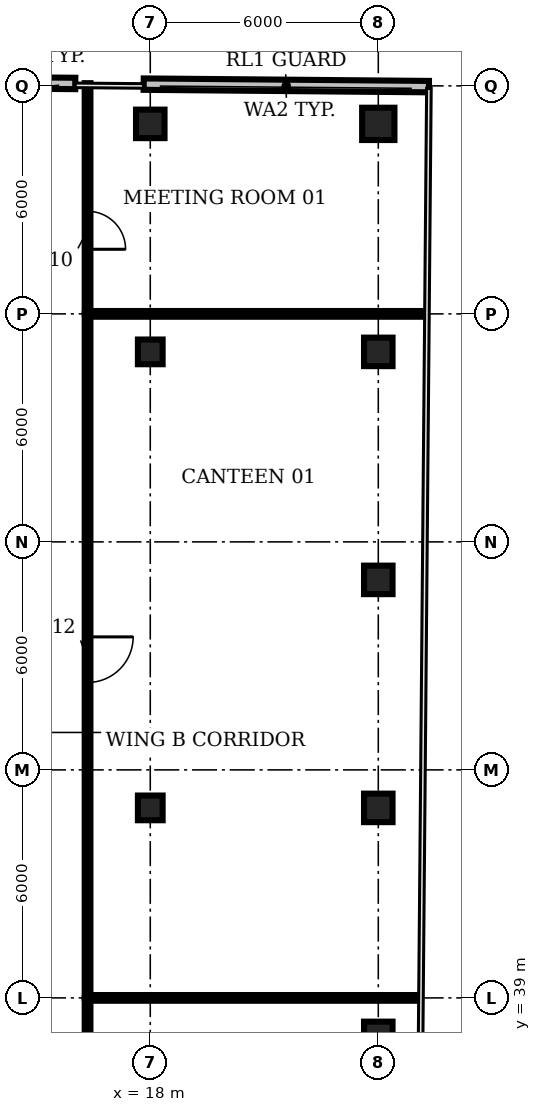
"""IFC4 building model, lengths in metres.
Left out: names, types, materials, properties, quantities, classifications, styles, units other than length and angle.
Written with IfcOpenShell. Run it as: python <this file> out.ifc"""

import sys

from ifc_helpers import new_model, si_unit, direction, frame, frame_2d, origin, origin_2d, place, context, subcontext, project, spatial, rectangle, circle, extrude, element, fill, save


model = new_model("IFC4")
c1 = context("Model", 3, precision=1e-05, world=origin(), true_north=direction((0.0, 1.0)))
c2 = subcontext(c1, "Body", "Model", "MODEL_VIEW")
j1 = project(units=[si_unit("LENGTHUNIT", "METRE"), si_unit("PLANEANGLEUNIT", "RADIAN")], contexts=[c1])
p1 = place(None, origin())
s1 = spatial("IfcSite", under=j1, at=p1, CompositionType="ELEMENT")
p2 = place(p1, origin())
s2 = spatial("IfcBuilding", under=s1, at=p2, CompositionType="ELEMENT")
p3 = place(p2, frame((0.0, 0.0, 285.2)))
s3 = spatial("IfcBuildingStorey", under=s2, at=p3, CompositionType="ELEMENT", Elevation=285.2)
for number, where, z_axis, x_axis in (
    (1, (18.0, 44.0, 0.0), (0.0, 0.0, 1.0), (1.0, 0.0, 0.0)),
    (2, (18.0, 56.0, 0.0), (0.0, 0.0, 1.0), (1.0, 0.0, 0.0)),
):
    element("IfcColumn", number, at=place(p3, frame(where, z_axis=z_axis, x_axis=x_axis)), inside=s3, PredefinedType="COLUMN", context=c2, shape_type="SweptSolid", body=[
        extrude(rectangle(XDim=0.65, YDim=0.65, at=origin_2d()), origin(), (0.0, 0.0, 1.0), 3.85),
    ])
for number, where, z_axis, x_axis in (
    (3, (18.0, 62.0, 0.0), (0.0, 0.0, 1.0), (1.0, 0.0, 0.0)),
    (4, (24.0, 38.0, 0.0), (0.0, 0.0, 1.0), (1.0, 0.0, 0.0)),
    (5, (24.0, 44.0, 0.0), (0.0, 0.0, 1.0), (1.0, 0.0, 0.0)),
    (6, (24.0, 50.0, 0.0), (0.0, 0.0, 1.0), (1.0, 0.0, 0.0)),
    (7, (24.0, 56.0, 0.0), (0.0, 0.0, 1.0), (1.0, 0.0, 0.0)),
):
    element("IfcColumn", number, at=place(p3, frame(where, z_axis=z_axis, x_axis=x_axis)), inside=s3, PredefinedType="COLUMN", context=c2, shape_type="SweptSolid", body=[
        extrude(rectangle(XDim=0.75, YDim=0.75, at=origin_2d()), origin(), (0.0, 0.0, 1.0), 3.85),
    ])
p4 = place(p3, frame((24.0, 62.0, 0.0), z_axis=(0.0, 0.0, 1.0), x_axis=(1.0, 0.0, 0.0)))
e8 = element("IfcColumn", 8, at=p4, inside=s3, PredefinedType="COLUMN", context=c2, shape_type="SweptSolid", body=[
    extrude(circle(Radius=0.425, at=origin_2d()), origin(), (0.0, 0.0, 1.0), 3.85),
])
p5 = place(p3, frame((25.332, 62.98, 0.0), z_axis=(0.0, 0.0, 1.0), x_axis=(-0.999961723794, 0.008749339829, 0.0)))
e9 = element("IfcWall", 9, at=p5, inside=s3, PredefinedType="SOLIDWALL", context=c2, shape_type="SweptSolid", body=[
    extrude(rectangle(XDim=7.506, YDim=0.3, at=frame_2d((3.753, 0.0))), origin(), (0.0, 0.0, 1.0), 3.85),
])
p6 = place(p3, frame((16.027, 63.063, 0.0), z_axis=(0.0, 0.0, 1.0), x_axis=(-0.999961913014, 0.008727687086, 0.0)))
e10 = element("IfcWall", 10, at=p6, inside=s3, PredefinedType="SOLIDWALL", context=c2, shape_type="SweptSolid", body=[
    extrude(rectangle(XDim=1.902, YDim=0.3, at=frame_2d((0.951, 0.0))), origin(), (0.0, 0.0, 1.0), 3.85),
])
p7 = place(p3, frame((16.35, 39.0, 0.0), z_axis=(0.0, 0.0, 1.0), x_axis=(0.0, -1.0, 0.0)))
e11 = element("IfcWall", 11, at=p7, inside=s3, PredefinedType="PARTITIONING", context=c2, shape_type="SweptSolid", body=[
    extrude(rectangle(XDim=5.2, YDim=0.15, at=frame_2d((2.6, 0.0))), origin(), (0.0, 0.0, 1.0), 2.9),
])
p8 = place(p7, frame((2.2, 0.0, 0.0)))
e12 = element("IfcOpeningElement", 12, at=p8, cuts=e11, PredefinedType="OPENING", context=c2, shape_type="SweptSolid", body=[
    extrude(rectangle(XDim=1.0, YDim=2.1, at=frame_2d((0.5, 1.05))), frame((0.0, 0.085, 0.0), z_axis=(0.0, -1.0, 0.0), x_axis=(1.0, 0.0, 0.0)), (0.0, 0.0, 1.0), 0.17),
])
p9 = place(p3, frame((16.35, 39.0, 0.0), z_axis=(0.0, 0.0, 1.0), x_axis=(1.0, 0.0, 0.0)))
e13 = element("IfcWall", 13, at=p9, inside=s3, PredefinedType="PARTITIONING", context=c2, shape_type="SweptSolid", body=[
    extrude(rectangle(XDim=8.72, YDim=0.15, at=frame_2d((4.36, 0.0))), origin(), (0.0, 0.0, 1.0), 2.9),
])
p10 = place(p3, frame((16.35, 57.0, 0.0), z_axis=(0.0, 0.0, 1.0), x_axis=(0.0, -1.0, 0.0)))
e14 = element("IfcWall", 14, at=p10, inside=s3, PredefinedType="PARTITIONING", context=c2, shape_type="SweptSolid", body=[
    extrude(rectangle(XDim=18.0, YDim=0.15, at=frame_2d((9.0, 0.0))), origin(), (0.0, 0.0, 1.0), 2.9),
])
p11 = place(p10, frame((8.5, 0.0, 0.0)))
e15 = element("IfcOpeningElement", 15, at=p11, cuts=e14, PredefinedType="OPENING", context=c2, shape_type="SweptSolid", body=[
    extrude(rectangle(XDim=1.2, YDim=2.1, at=frame_2d((0.6, 1.05))), frame((0.0, 0.085, 0.0), z_axis=(0.0, -1.0, 0.0), x_axis=(1.0, 0.0, 0.0)), (0.0, 0.0, 1.0), 0.17),
])
p12 = place(p3, frame((16.35, 57.0, 0.0), z_axis=(0.0, 0.0, 1.0), x_axis=(1.0, 0.0, 0.0)))
e16 = element("IfcWall", 16, at=p12, inside=s3, PredefinedType="PARTITIONING", context=c2, shape_type="SweptSolid", body=[
    extrude(rectangle(XDim=8.88, YDim=0.15, at=frame_2d((4.44, 0.0))), origin(), (0.0, 0.0, 1.0), 2.9),
])
p13 = place(p3, frame((16.35, 63.071, 0.0), z_axis=(0.0, 0.0, 1.0), x_axis=(0.0, -1.0, 0.0)))
e17 = element("IfcWall", 17, at=p13, inside=s3, PredefinedType="PARTITIONING", context=c2, shape_type="SweptSolid", body=[
    extrude(rectangle(XDim=6.071, YDim=0.15, at=frame_2d((3.035, 0.0))), origin(), (0.0, 0.0, 1.0), 2.9),
])
p14 = place(p13, frame((3.371, 0.0, 0.0)))
e18 = element("IfcOpeningElement", 18, at=p14, cuts=e17, PredefinedType="OPENING", context=c2, shape_type="SweptSolid", body=[
    extrude(rectangle(XDim=1.0, YDim=2.1, at=frame_2d((0.5, 1.05))), frame((0.0, 0.085, 0.0), z_axis=(0.0, -1.0, 0.0), x_axis=(1.0, 0.0, 0.0)), (0.0, 0.0, 1.0), 0.17),
])
p15 = place(p11, origin())
e19 = element("IfcDoor", 19, at=p15, inside=s3, OperationType="SINGLE_SWING_LEFT", PredefinedType="DOOR", context=c2, shape_type="SweptSolid", body=[
    extrude(rectangle(XDim=1.2, YDim=2.1, at=frame_2d((0.6, 1.05))), frame((0.0, 0.025, 0.0), z_axis=(0.0, -1.0, 0.0), x_axis=(1.0, 0.0, 0.0)), (0.0, 0.0, 1.0), 0.05),
])
fill(e15, e19)
p16 = place(p14, origin())
e20 = element("IfcDoor", 20, at=p16, inside=s3, OperationType="SINGLE_SWING_RIGHT", PredefinedType="DOOR", context=c2, shape_type="SweptSolid", body=[
    extrude(rectangle(XDim=1.0, YDim=2.1, at=frame_2d((0.5, 1.05))), frame((0.0, 0.025, 0.0), z_axis=(0.0, -1.0, 0.0), x_axis=(1.0, 0.0, 0.0)), (0.0, 0.0, 1.0), 0.05),
])
fill(e18, e20)
save(model, sys.argv[1])
